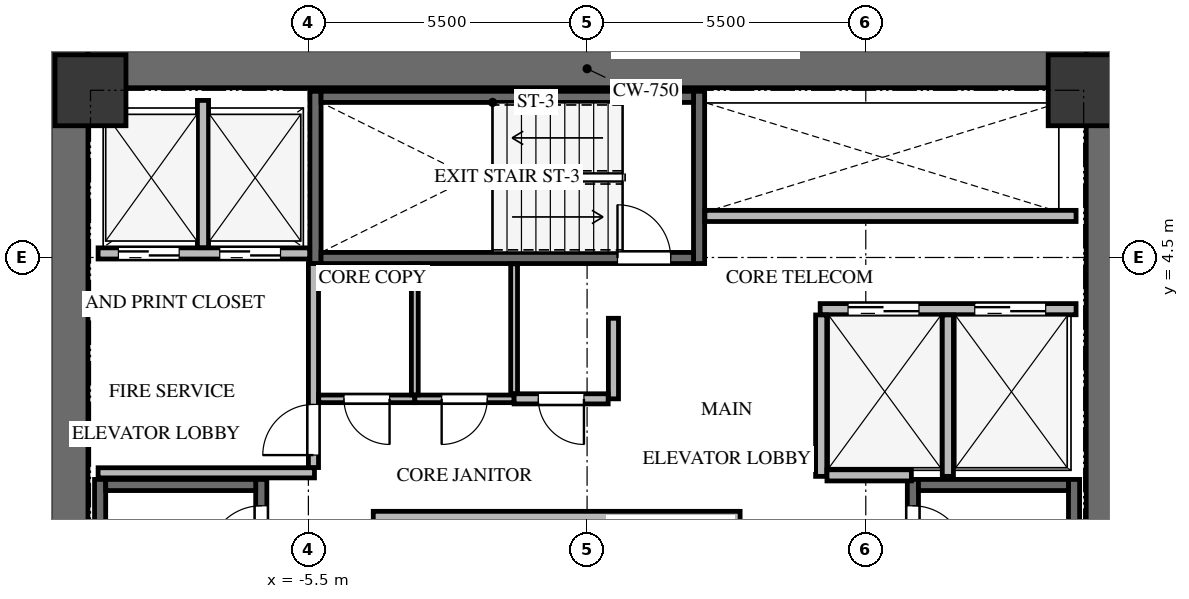
"""IFC4 building model, lengths in metres.
Left out: names, types, materials, properties, quantities, classifications, styles, units other than length and angle.
Written with IfcOpenShell. Run it as: python <this file> out.ifc"""

import sys

from ifc_helpers import new_model, si_unit, direction, frame, frame_2d, origin, origin_2d, place, context, subcontext, project, spatial, rectangle, extrude, source, transform, mapped, element, fill, save


model = new_model("IFC4")
c1 = context("Model", 3, precision=1e-05, world=origin(), true_north=direction((0.0, 1.0)))
c2 = subcontext(c1, "Body", "Model", "MODEL_VIEW")
j1 = project(units=[si_unit("LENGTHUNIT", "METRE"), si_unit("PLANEANGLEUNIT", "RADIAN")], contexts=[c1])
p1 = place(None, origin())
s1 = spatial("IfcSite", under=j1, at=p1, CompositionType="ELEMENT")
p2 = place(p1, origin())
s2 = spatial("IfcBuilding", under=s1, at=p2, CompositionType="ELEMENT")
p3 = place(p2, frame((0.0, 0.0, 107.4)))
s3 = spatial("IfcBuildingStorey", under=s2, at=p3, CompositionType="ELEMENT", Elevation=107.4)
for number, where, z_axis, x_axis in (
    (1, (-10.225, -8.6, 0.0), (0.0, 0.0, 1.0), (0.0, 1.0, 0.0)),
    (2, (10.225, -8.6, 0.0), (0.0, 0.0, 1.0), (0.0, 1.0, 0.0)),
):
    element("IfcWall", number, at=place(p3, frame(where, z_axis=z_axis, x_axis=x_axis)), inside=s3, PredefinedType="SHEAR", context=c2, shape_type="SweptSolid", body=[
        extrude(rectangle(XDim=17.2, YDim=0.75, at=frame_2d((8.6, 0.0))), origin(), (0.0, 0.0, 1.0), 3.3),
    ])
p4 = place(p3, frame((-9.85, 8.225, 0.0), z_axis=(0.0, 0.0, 1.0), x_axis=(1.0, 0.0, 0.0)))
e3 = element("IfcWall", 3, at=p4, inside=s3, PredefinedType="SHEAR", context=c2, shape_type="SweptSolid", body=[
    extrude(rectangle(XDim=19.7, YDim=0.75, at=frame_2d((9.85, 0.0))), origin(), (0.0, 0.0, 1.0), 3.3),
])
p5 = place(p3, frame((-6.43, -7.77, -0.24), z_axis=(0.0, 0.0, 1.0), x_axis=(0.0, 1.0, 0.0)))
e4 = element("IfcWall", 4, at=p5, inside=s3, PredefinedType="SHEAR", context=c2, shape_type="SweptSolid", body=[
    extrude(rectangle(XDim=7.89, YDim=0.22, at=frame_2d((3.945, 0.0))), origin(), (0.0, 0.0, 1.0), 3.3),
])
p6 = place(p5, frame((6.32, 0.0, 0.0)))
e5 = element("IfcOpeningElement", 5, at=p6, cuts=e4, PredefinedType="OPENING", context=c2, shape_type="SweptSolid", body=[
    extrude(rectangle(XDim=1.05, YDim=2.15, at=frame_2d((0.525, 1.075))), frame((0.0, 0.12, 0.0), z_axis=(0.0, -1.0, 0.0), x_axis=(1.0, 0.0, 0.0)), (0.0, 0.0, 1.0), 0.24),
])
p7 = place(p3, frame((-9.61, 0.12, -0.24), z_axis=(0.0, 0.0, 1.0), x_axis=(0.0, -1.0, 0.0)))
e6 = element("IfcWall", 6, at=p7, inside=s3, PredefinedType="SHEAR", context=c2, shape_type="SweptSolid", body=[
    extrude(rectangle(XDim=7.89, YDim=0.22, at=frame_2d((3.945, 0.0))), origin(), (0.0, 0.0, 1.0), 3.3),
])
p8 = place(p3, frame((-6.54, 0.01, -0.24), z_axis=(0.0, 0.0, 1.0), x_axis=(-1.0, 0.0, 0.0)))
e7 = element("IfcWall", 7, at=p8, inside=s3, PredefinedType="SHEAR", context=c2, shape_type="SweptSolid", body=[
    extrude(rectangle(XDim=2.96, YDim=0.22, at=frame_2d((1.48, 0.0))), origin(), (0.0, 0.0, 1.0), 3.3),
])
p9 = place(p3, frame((9.61, -7.77, -0.24), z_axis=(0.0, 0.0, 1.0), x_axis=(0.0, 1.0, 0.0)))
e8 = element("IfcWall", 8, at=p9, inside=s3, PredefinedType="SHEAR", context=c2, shape_type="SweptSolid", body=[
    extrude(rectangle(XDim=7.89, YDim=0.22, at=frame_2d((3.945, 0.0))), origin(), (0.0, 0.0, 1.0), 3.3),
])
p10 = place(p3, frame((6.43, 0.12, -0.24), z_axis=(0.0, 0.0, 1.0), x_axis=(0.0, -1.0, 0.0)))
e9 = element("IfcWall", 9, at=p10, inside=s3, PredefinedType="SHEAR", context=c2, shape_type="SweptSolid", body=[
    extrude(rectangle(XDim=7.89, YDim=0.22, at=frame_2d((3.945, 0.0))), origin(), (0.0, 0.0, 1.0), 3.3),
])
p11 = place(p10, frame((0.52, 0.0, 0.0)))
e10 = element("IfcOpeningElement", 10, at=p11, cuts=e9, PredefinedType="OPENING", context=c2, shape_type="SweptSolid", body=[
    extrude(rectangle(XDim=1.05, YDim=2.15, at=frame_2d((0.525, 1.075))), frame((0.0, 0.12, 0.0), z_axis=(0.0, -1.0, 0.0), x_axis=(1.0, 0.0, 0.0)), (0.0, 0.0, 1.0), 0.24),
])
p12 = place(p3, frame((9.5, 0.01, -0.24), z_axis=(0.0, 0.0, 1.0), x_axis=(-1.0, 0.0, 0.0)))
e11 = element("IfcWall", 11, at=p12, inside=s3, PredefinedType="SHEAR", context=c2, shape_type="SweptSolid", body=[
    extrude(rectangle(XDim=2.96, YDim=0.22, at=frame_2d((1.48, 0.0))), origin(), (0.0, 0.0, 1.0), 3.3),
])
for number, where, z_axis, x_axis in (
    (12, (2.21, 4.38, -0.24), (0.0, 0.0, 1.0), (0.0, 1.0, 0.0)),
    (13, (-5.36, 7.78, -0.24), (0.0, 0.0, 1.0), (0.0, -1.0, 0.0)),
):
    element("IfcWall", number, at=place(p3, frame(where, z_axis=z_axis, x_axis=x_axis)), inside=s3, PredefinedType="SHEAR", context=c2, shape_type="SweptSolid", body=[
        extrude(rectangle(XDim=3.4, YDim=0.22, at=frame_2d((1.7, 0.0))), origin(), (0.0, 0.0, 1.0), 3.3),
    ])
p13 = place(p3, frame((-5.25, 4.49, -0.24), z_axis=(0.0, 0.0, 1.0), x_axis=(1.0, 0.0, 0.0)))
e14 = element("IfcWall", 14, at=p13, inside=s3, PredefinedType="SHEAR", context=c2, shape_type="SweptSolid", body=[
    extrude(rectangle(XDim=7.35, YDim=0.22, at=frame_2d((3.675, 0.0))), origin(), (0.0, 0.0, 1.0), 3.3),
])
p14 = place(p13, frame((5.85, 0.0, 0.0)))
e15 = element("IfcOpeningElement", 15, at=p14, cuts=e14, PredefinedType="OPENING", context=c2, shape_type="SweptSolid", body=[
    extrude(rectangle(XDim=1.05, YDim=2.15, at=frame_2d((0.525, 1.075))), frame((0.0, 0.12, 0.0), z_axis=(0.0, -1.0, 0.0), x_axis=(1.0, 0.0, 0.0)), (0.0, 0.0, 1.0), 0.24),
])
p15 = place(p3, frame((2.1, 7.67, -0.24), z_axis=(0.0, 0.0, 1.0), x_axis=(-1.0, 0.0, 0.0)))
e16 = element("IfcWall", 16, at=p15, inside=s3, PredefinedType="SHEAR", context=c2, shape_type="SweptSolid", body=[
    extrude(rectangle(XDim=7.35, YDim=0.22, at=frame_2d((3.675, 0.0))), origin(), (0.0, 0.0, 1.0), 3.3),
])
m1 = source(origin(), c2, "Body", "SweptSolid", [
    extrude(rectangle(XDim=1.4, YDim=1.4, at=origin_2d()), origin(), (0.0, 0.0, 1.0), 3.3),
])
for number, where, z_axis, x_axis in (
    (17, (9.8, 7.8, -0.24), (0.0, 0.0, 1.0), (1.0, 0.0, 0.0)),
    (18, (-9.8, 7.8, -0.24), (0.0, 0.0, 1.0), (1.0, 0.0, 0.0)),
):
    element("IfcColumn", number, at=place(p3, frame(where, z_axis=z_axis, x_axis=x_axis)), inside=s3, PredefinedType="COLUMN", context=c2, shape_type="MappedRepresentation", body=[
        mapped(m1, transform((0.0, 0.0, 0.0), x_axis=(1.0, 0.0, 0.0), y_axis=(0.0, 1.0, 0.0), z_axis=(0.0, 0.0, 1.0), scale=1.0)),
    ])
p16 = place(p3, frame((-9.65, 4.58, 0.0), z_axis=(0.0, 0.0, 1.0), x_axis=(1.0, 0.0, 0.0)))
e19 = element("IfcWall", 19, at=p16, inside=s3, PredefinedType="SOLIDWALL", context=c2, shape_type="SweptSolid", body=[
    extrude(rectangle(XDim=4.175, YDim=0.22, at=frame_2d((2.087, 0.0))), origin(), (0.0, 0.0, 1.0), 3.045),
])
p17 = place(p16, frame((0.4, 0.0, 0.0)))
e20 = element("IfcOpeningElement", 20, at=p17, cuts=e19, PredefinedType="OPENING", context=c2, shape_type="SweptSolid", body=[
    extrude(rectangle(XDim=1.2, YDim=2.15, at=frame_2d((0.6, 1.075))), frame((0.0, 0.12, 0.0), z_axis=(0.0, -1.0, 0.0), x_axis=(1.0, 0.0, 0.0)), (0.0, 0.0, 1.0), 0.24),
])
p18 = place(p16, frame((2.4, 0.0, 0.0)))
e21 = element("IfcOpeningElement", 21, at=p18, cuts=e19, PredefinedType="OPENING", context=c2, shape_type="SweptSolid", body=[
    extrude(rectangle(XDim=1.2, YDim=2.15, at=frame_2d((0.6, 1.075))), frame((0.0, 0.12, 0.0), z_axis=(0.0, -1.0, 0.0), x_axis=(1.0, 0.0, 0.0)), (0.0, 0.0, 1.0), 0.24),
])
p19 = place(p3, frame((-7.58, 4.694, 0.0), z_axis=(0.0, 0.0, 1.0), x_axis=(0.0, 1.0, 0.0)))
e22 = element("IfcWall", 22, at=p19, inside=s3, PredefinedType="SOLIDWALL", context=c2, shape_type="SweptSolid", body=[
    extrude(rectangle(XDim=2.906, YDim=0.22, at=frame_2d((1.453, 0.0))), origin(), (0.0, 0.0, 1.0), 3.045),
])
p20 = place(p3, frame((-9.65, 0.25, 0.0), z_axis=(0.0, 0.0, 1.0), x_axis=(1.0, 0.0, 0.0)))
e23 = element("IfcWall", 23, at=p20, inside=s3, PredefinedType="SOLIDWALL", context=c2, shape_type="SweptSolid", body=[
    extrude(rectangle(XDim=4.27, YDim=0.2, at=frame_2d((2.135, 0.0))), origin(), (0.0, 0.0, 1.0), 3.045),
])
p21 = place(p3, frame((-5.4, 0.354, 0.0), z_axis=(0.0, 0.0, 1.0), x_axis=(0.0, 1.0, 0.0)))
e24 = element("IfcWall", 24, at=p21, inside=s3, PredefinedType="SOLIDWALL", context=c2, shape_type="SweptSolid", body=[
    extrude(rectangle(XDim=4.026, YDim=0.2, at=frame_2d((2.013, 0.0))), origin(), (0.0, 0.0, 1.0), 3.045),
])
p22 = place(p21, frame((0.246, 0.0, 0.0)))
e25 = element("IfcOpeningElement", 25, at=p22, cuts=e24, PredefinedType="OPENING", context=c2, shape_type="SweptSolid", body=[
    extrude(rectangle(XDim=1.0, YDim=2.15, at=frame_2d((0.5, 1.075))), frame((0.0, 0.11, 0.0), z_axis=(0.0, -1.0, 0.0), x_axis=(1.0, 0.0, 0.0)), (0.0, 0.0, 1.0), 0.22),
])
p23 = place(p3, frame((4.6, 3.48, 0.0), z_axis=(0.0, 0.0, 1.0), x_axis=(1.0, 0.0, 0.0)))
e26 = element("IfcWall", 26, at=p23, inside=s3, PredefinedType="SOLIDWALL", context=c2, shape_type="SweptSolid", body=[
    extrude(rectangle(XDim=5.05, YDim=0.22, at=frame_2d((2.525, 0.0))), origin(), (0.0, 0.0, 1.0), 3.045),
])
p24 = place(p23, frame((0.55, 0.0, 0.0)))
e27 = element("IfcOpeningElement", 27, at=p24, cuts=e26, PredefinedType="OPENING", context=c2, shape_type="SweptSolid", body=[
    extrude(rectangle(XDim=1.4, YDim=2.15, at=frame_2d((0.7, 1.075))), frame((0.0, 0.12, 0.0), z_axis=(0.0, -1.0, 0.0), x_axis=(1.0, 0.0, 0.0)), (0.0, 0.0, 1.0), 0.24),
])
p25 = place(p23, frame((3.05, 0.0, 0.0)))
e28 = element("IfcOpeningElement", 28, at=p25, cuts=e26, PredefinedType="OPENING", context=c2, shape_type="SweptSolid", body=[
    extrude(rectangle(XDim=1.4, YDim=2.15, at=frame_2d((0.7, 1.075))), frame((0.0, 0.12, 0.0), z_axis=(0.0, -1.0, 0.0), x_axis=(1.0, 0.0, 0.0)), (0.0, 0.0, 1.0), 0.24),
])
for number, where, z_axis, x_axis in (
    (29, (4.62, 0.18, 0.0), (0.0, 0.0, 1.0), (0.0, 1.0, 0.0)),
    (30, (7.12, 0.18, 0.0), (0.0, 0.0, 1.0), (0.0, 1.0, 0.0)),
):
    element("IfcWall", number, at=place(p3, frame(where, z_axis=z_axis, x_axis=x_axis)), inside=s3, PredefinedType="SOLIDWALL", context=c2, shape_type="SweptSolid", body=[
        extrude(rectangle(XDim=3.186, YDim=0.22, at=frame_2d((1.593, 0.0))), origin(), (0.0, 0.0, 1.0), 3.045),
    ])
p26 = place(p3, frame((4.734, 0.2, 0.0), z_axis=(0.0, 0.0, 1.0), x_axis=(1.0, 0.0, 0.0)))
e31 = element("IfcWall", 31, at=p26, inside=s3, PredefinedType="SOLIDWALL", context=c2, shape_type="SweptSolid", body=[
    extrude(rectangle(XDim=1.666, YDim=0.22, at=frame_2d((0.833, 0.0))), origin(), (0.0, 0.0, 1.0), 3.045),
])
p27 = place(p3, frame((-4.22, -0.62, 0.0), z_axis=(0.0, 0.0, 1.0), x_axis=(1.0, 0.0, 0.0)))
e32 = element("IfcWall", 32, at=p27, inside=s3, PredefinedType="SOLIDWALL", context=c2, shape_type="SweptSolid", body=[
    extrude(rectangle(XDim=7.24, YDim=0.22, at=frame_2d((3.62, 0.0))), origin(), (0.0, 0.0, 1.0), 3.045),
])
p28 = place(p3, frame((2.325, 5.32, 0.0), z_axis=(0.0, 0.0, 1.0), x_axis=(1.0, 0.0, 0.0)))
e33 = element("IfcWall", 33, at=p28, inside=s3, PredefinedType="SOLIDWALL", context=c2, shape_type="SweptSolid", body=[
    extrude(rectangle(XDim=7.325, YDim=0.22, at=frame_2d((3.663, 0.0))), origin(), (0.0, 0.0, 1.0), 3.045),
])
p29 = place(p3, frame((-3.4, 1.71, 0.0), z_axis=(0.0, 0.0, 1.0), x_axis=(-1.0, 0.0, 0.0)))
e34 = element("IfcWall", 34, at=p29, inside=s3, PredefinedType="PARTITIONING", context=c2, shape_type="SweptSolid", body=[
    extrude(rectangle(XDim=1.896, YDim=0.15, at=frame_2d((0.948, 0.0))), origin(), (0.0, 0.0, 1.0), 3.045),
])
p30 = place(p29, frame((0.498, 0.0, 0.0)))
e35 = element("IfcOpeningElement", 35, at=p30, cuts=e34, PredefinedType="OPENING", context=c2, shape_type="SweptSolid", body=[
    extrude(rectangle(XDim=0.9, YDim=2.05, at=frame_2d((0.45, 1.025))), frame((0.0, 0.085, 0.0), z_axis=(0.0, -1.0, 0.0), x_axis=(1.0, 0.0, 0.0)), (0.0, 0.0, 1.0), 0.17),
])
p31 = place(p3, frame((-1.44, 1.71, 0.0), z_axis=(0.0, 0.0, 1.0), x_axis=(-1.0, 0.0, 0.0)))
e36 = element("IfcWall", 36, at=p31, inside=s3, PredefinedType="PARTITIONING", context=c2, shape_type="SweptSolid", body=[
    extrude(rectangle(XDim=1.96, YDim=0.15, at=frame_2d((0.98, 0.0))), origin(), (0.0, 0.0, 1.0), 3.045),
])
p32 = place(p31, frame((0.53, 0.0, 0.0)))
e37 = element("IfcOpeningElement", 37, at=p32, cuts=e36, PredefinedType="OPENING", context=c2, shape_type="SweptSolid", body=[
    extrude(rectangle(XDim=0.9, YDim=2.05, at=frame_2d((0.45, 1.025))), frame((0.0, 0.085, 0.0), z_axis=(0.0, -1.0, 0.0), x_axis=(1.0, 0.0, 0.0)), (0.0, 0.0, 1.0), 0.17),
])
p33 = place(p3, frame((0.52, 3.3, 0.0), z_axis=(0.0, 0.0, 1.0), x_axis=(0.0, -1.0, 0.0)))
e38 = element("IfcWall", 38, at=p33, inside=s3, PredefinedType="SOLIDWALL", context=c2, shape_type="SweptSolid", body=[
    extrude(rectangle(XDim=1.59, YDim=0.2, at=frame_2d((0.795, 0.0))), origin(), (0.0, 0.0, 1.0), 3.045),
])
p34 = place(p3, frame((0.416, 1.71, 0.0), z_axis=(0.0, 0.0, 1.0), x_axis=(-1.0, 0.0, 0.0)))
e39 = element("IfcWall", 39, at=p34, inside=s3, PredefinedType="SOLIDWALL", context=c2, shape_type="SweptSolid", body=[
    extrude(rectangle(XDim=1.856, YDim=0.2, at=frame_2d((0.928, 0.0))), origin(), (0.0, 0.0, 1.0), 3.045),
])
p35 = place(p34, frame((0.478, 0.0, 0.0)))
e40 = element("IfcOpeningElement", 40, at=p35, cuts=e39, PredefinedType="OPENING", context=c2, shape_type="SweptSolid", body=[
    extrude(rectangle(XDim=0.9, YDim=2.05, at=frame_2d((0.45, 1.025))), frame((0.0, 0.11, 0.0), z_axis=(0.0, -1.0, 0.0), x_axis=(1.0, 0.0, 0.0)), (0.0, 0.0, 1.0), 0.22),
])
p36 = place(p3, frame((-3.4, 4.375, 0.0), z_axis=(0.0, 0.0, 1.0), x_axis=(0.0, -1.0, 0.0)))
e41 = element("IfcWall", 41, at=p36, inside=s3, PredefinedType="PARTITIONING", context=c2, shape_type="SweptSolid", body=[
    extrude(rectangle(XDim=2.586, YDim=0.135, at=frame_2d((1.293, 0.0))), origin(), (0.0, 0.0, 1.0), 3.045),
])
p37 = place(p3, frame((-1.44, 4.375, 0.0), z_axis=(0.0, 0.0, 1.0), x_axis=(0.0, -1.0, 0.0)))
e42 = element("IfcWall", 42, at=p37, inside=s3, PredefinedType="PARTITIONING", context=c2, shape_type="SweptSolid", body=[
    extrude(rectangle(XDim=2.561, YDim=0.135, at=frame_2d((1.281, 0.0))), origin(), (0.0, 0.0, 1.0), 3.045),
])
m2 = source(origin(), c2, "Body", "SweptSolid", [
    extrude(rectangle(XDim=1.05, YDim=2.15, at=frame_2d((0.525, 1.075))), frame((0.0, 0.025, 0.0), z_axis=(0.0, -1.0, 0.0), x_axis=(1.0, 0.0, 0.0)), (0.0, 0.0, 1.0), 0.05),
])
p38 = place(p6, origin())
e43 = element("IfcDoor", 43, at=p38, inside=s3, OperationType="SINGLE_SWING_LEFT", PredefinedType="DOOR", context=c2, shape_type="MappedRepresentation", body=[
    mapped(m2, transform((0.0, 0.0, 0.0), x_axis=(1.0, 0.0, 0.0), y_axis=(0.0, 1.0, 0.0), z_axis=(0.0, 0.0, 1.0), scale=1.0)),
])
fill(e5, e43)
m3 = source(origin(), c2, "Body", "SweptSolid", [
    extrude(rectangle(XDim=1.05, YDim=2.15, at=frame_2d((0.525, 1.075))), frame((0.0, 0.025, 0.0), z_axis=(0.0, -1.0, 0.0), x_axis=(1.0, 0.0, 0.0)), (0.0, 0.0, 1.0), 0.05),
])
p39 = place(p11, origin())
e44 = element("IfcDoor", 44, at=p39, inside=s3, OperationType="SINGLE_SWING_RIGHT", PredefinedType="DOOR", context=c2, shape_type="MappedRepresentation", body=[
    mapped(m3, transform((0.0, 0.0, 0.0), x_axis=(1.0, 0.0, 0.0), y_axis=(0.0, 1.0, 0.0), z_axis=(0.0, 0.0, 1.0), scale=1.0)),
])
fill(e10, e44)
p40 = place(p14, origin())
e45 = element("IfcDoor", 45, at=p40, inside=s3, OperationType="SINGLE_SWING_LEFT", PredefinedType="DOOR", context=c2, shape_type="MappedRepresentation", body=[
    mapped(m2, transform((0.0, 0.0, 0.0), x_axis=(1.0, 0.0, 0.0), y_axis=(0.0, 1.0, 0.0), z_axis=(0.0, 0.0, 1.0), scale=1.0)),
])
fill(e15, e45)
m4 = source(origin(), c2, "Body", "SweptSolid", [
    extrude(rectangle(XDim=1.2, YDim=2.15, at=frame_2d((0.6, 1.075))), frame((0.0, 0.025, 0.0), z_axis=(0.0, -1.0, 0.0), x_axis=(1.0, 0.0, 0.0)), (0.0, 0.0, 1.0), 0.05),
])
p41 = place(p17, origin())
e46 = element("IfcDoor", 46, at=p41, inside=s3, OperationType="DOUBLE_DOOR_SLIDING", PredefinedType="DOOR", context=c2, shape_type="MappedRepresentation", body=[
    mapped(m4, transform((0.0, 0.0, 0.0), x_axis=(1.0, 0.0, 0.0), y_axis=(0.0, 1.0, 0.0), z_axis=(0.0, 0.0, 1.0), scale=1.0)),
])
fill(e20, e46)
p42 = place(p18, origin())
e47 = element("IfcDoor", 47, at=p42, inside=s3, OperationType="DOUBLE_DOOR_SLIDING", PredefinedType="DOOR", context=c2, shape_type="MappedRepresentation", body=[
    mapped(m4, transform((0.0, 0.0, 0.0), x_axis=(1.0, 0.0, 0.0), y_axis=(0.0, 1.0, 0.0), z_axis=(0.0, 0.0, 1.0), scale=1.0)),
])
fill(e21, e47)
m5 = source(origin(), c2, "Body", "SweptSolid", [
    extrude(rectangle(XDim=1.0, YDim=2.15, at=frame_2d((0.5, 1.075))), frame((0.0, 0.025, 0.0), z_axis=(0.0, -1.0, 0.0), x_axis=(1.0, 0.0, 0.0)), (0.0, 0.0, 1.0), 0.05),
])
p43 = place(p22, origin())
e48 = element("IfcDoor", 48, at=p43, inside=s3, OperationType="SINGLE_SWING_LEFT", PredefinedType="DOOR", context=c2, shape_type="MappedRepresentation", body=[
    mapped(m5, transform((0.0, 0.0, 0.0), x_axis=(1.0, 0.0, 0.0), y_axis=(0.0, 1.0, 0.0), z_axis=(0.0, 0.0, 1.0), scale=1.0)),
])
fill(e25, e48)
m6 = source(origin(), c2, "Body", "SweptSolid", [
    extrude(rectangle(XDim=1.4, YDim=2.15, at=frame_2d((0.7, 1.075))), frame((0.0, 0.025, 0.0), z_axis=(0.0, -1.0, 0.0), x_axis=(1.0, 0.0, 0.0)), (0.0, 0.0, 1.0), 0.05),
])
p44 = place(p24, origin())
e49 = element("IfcDoor", 49, at=p44, inside=s3, OperationType="DOUBLE_DOOR_SLIDING", PredefinedType="DOOR", context=c2, shape_type="MappedRepresentation", body=[
    mapped(m6, transform((0.0, 0.0, 0.0), x_axis=(1.0, 0.0, 0.0), y_axis=(0.0, 1.0, 0.0), z_axis=(0.0, 0.0, 1.0), scale=1.0)),
])
fill(e27, e49)
p45 = place(p25, origin())
e50 = element("IfcDoor", 50, at=p45, inside=s3, OperationType="DOUBLE_DOOR_SLIDING", PredefinedType="DOOR", context=c2, shape_type="MappedRepresentation", body=[
    mapped(m6, transform((0.0, 0.0, 0.0), x_axis=(1.0, 0.0, 0.0), y_axis=(0.0, 1.0, 0.0), z_axis=(0.0, 0.0, 1.0), scale=1.0)),
])
fill(e28, e50)
m7 = source(origin(), c2, "Body", "SweptSolid", [
    extrude(rectangle(XDim=0.9, YDim=2.05, at=frame_2d((0.45, 1.025))), frame((0.0, 0.025, 0.0), z_axis=(0.0, -1.0, 0.0), x_axis=(1.0, 0.0, 0.0)), (0.0, 0.0, 1.0), 0.05),
])
p46 = place(p30, origin())
e51 = element("IfcDoor", 51, at=p46, inside=s3, OperationType="SINGLE_SWING_LEFT", PredefinedType="DOOR", context=c2, shape_type="MappedRepresentation", body=[
    mapped(m7, transform((0.0, 0.0, 0.0), x_axis=(1.0, 0.0, 0.0), y_axis=(0.0, 1.0, 0.0), z_axis=(0.0, 0.0, 1.0), scale=1.0)),
])
fill(e35, e51)
m8 = source(origin(), c2, "Body", "SweptSolid", [
    extrude(rectangle(XDim=0.9, YDim=2.05, at=frame_2d((0.45, 1.025))), frame((0.0, 0.025, 0.0), z_axis=(0.0, -1.0, 0.0), x_axis=(1.0, 0.0, 0.0)), (0.0, 0.0, 1.0), 0.05),
])
p47 = place(p32, origin())
e52 = element("IfcDoor", 52, at=p47, inside=s3, OperationType="SINGLE_SWING_RIGHT", PredefinedType="DOOR", context=c2, shape_type="MappedRepresentation", body=[
    mapped(m8, transform((0.0, 0.0, 0.0), x_axis=(1.0, 0.0, 0.0), y_axis=(0.0, 1.0, 0.0), z_axis=(0.0, 0.0, 1.0), scale=1.0)),
])
fill(e37, e52)
p48 = place(p35, origin())
e53 = element("IfcDoor", 53, at=p48, inside=s3, OperationType="SINGLE_SWING_LEFT", PredefinedType="DOOR", context=c2, shape_type="MappedRepresentation", body=[
    mapped(m7, transform((0.0, 0.0, 0.0), x_axis=(1.0, 0.0, 0.0), y_axis=(0.0, 1.0, 0.0), z_axis=(0.0, 0.0, 1.0), scale=1.0)),
])
fill(e40, e53)
save(model, sys.argv[1])
